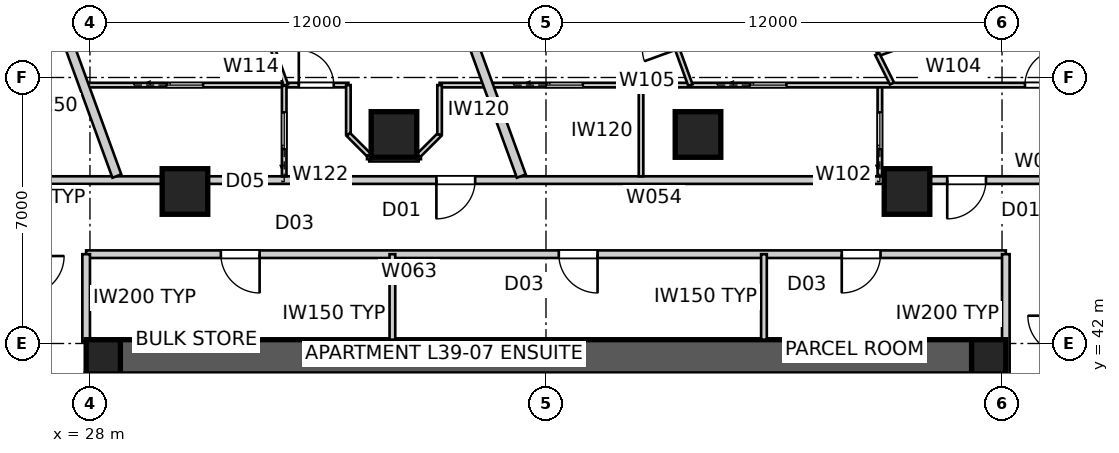
"""IFC4 building model, lengths in metres.
Left out: names, types, materials, properties, quantities, classifications, styles, units other than length and angle.
Written with IfcOpenShell. Run it as: python <this file> out.ifc"""

import sys

from ifc_helpers import new_model, si_unit, direction, frame, frame_2d, origin, origin_2d, place, context, subcontext, project, spatial, polyline, rectangle, outline, extrude, element, fill, save


model = new_model("IFC4")
c1 = context("Model", 3, precision=1e-05, world=origin(), true_north=direction((0.0, 1.0)))
c2 = subcontext(c1, "Body", "Model", "MODEL_VIEW")
j1 = project(units=[si_unit("LENGTHUNIT", "METRE"), si_unit("PLANEANGLEUNIT", "RADIAN")], contexts=[c1])
p1 = place(None, origin())
s1 = spatial("IfcSite", under=j1, at=p1, CompositionType="ELEMENT")
p2 = place(p1, origin())
s2 = spatial("IfcBuilding", under=s1, at=p2, CompositionType="ELEMENT")
p3 = place(p2, frame((0.0, 0.0, 143.8)))
s3 = spatial("IfcBuildingStorey", under=s2, at=p3, CompositionType="ELEMENT", Elevation=143.8)
p4 = place(p3, frame((28.8, 41.65, 0.0), z_axis=(0.0, 0.0, 1.0), x_axis=(1.0, 0.0, 0.0)))
e1 = element("IfcWall", 1, at=p4, inside=s3, PredefinedType="SHEAR", context=c2, shape_type="SweptSolid", body=[
    extrude(outline(polyline([(0.0, -0.45), (22.4, -0.45), (22.4, -0.025), (22.85, -0.025), (22.85, 0.025), (22.4, 0.025), (22.4, 0.45), (0.0, 0.45), (0.0, 0.025), (-0.45, 0.025), (-0.45, -0.025), (0.0, -0.025), (0.0, -0.45)])), origin(), (0.0, 0.0, 1.0), 3.4),
])
p5 = place(p3, frame((51.65, 18.8, 0.0), z_axis=(0.0, 0.0, 1.0), x_axis=(0.0, 1.0, 0.0)))
e2 = element("IfcWall", 2, at=p5, inside=s3, PredefinedType="SHEAR", context=c2, shape_type="SweptSolid", body=[
    extrude(outline(polyline([(0.0, -0.45), (22.4, -0.45), (22.4, -0.025), (22.85, -0.025), (22.85, 0.025), (22.4, 0.025), (22.4, 0.45), (0.0, 0.45), (0.0, 0.025), (-0.45, 0.025), (-0.45, -0.025), (0.0, -0.025), (0.0, -0.45)])), origin(), (0.0, 0.0, 1.0), 3.4),
])
p6 = place(p5, frame((11.14, 0.0, 0.0)))
e3 = element("IfcOpeningElement", 3, at=p6, cuts=e2, PredefinedType="OPENING", context=c2, shape_type="SweptSolid", body=[
    extrude(rectangle(XDim=1.02, YDim=2.4, at=frame_2d((0.51, 1.2))), frame((0.0, 0.46, 0.0), z_axis=(0.0, -1.0, 0.0), x_axis=(1.0, 0.0, 0.0)), (0.0, 0.0, 1.0), 0.92),
])
p7 = place(p3, frame((28.35, 41.2, 0.0), z_axis=(0.0, 0.0, 1.0), x_axis=(0.0, -1.0, 0.0)))
e4 = element("IfcWall", 4, at=p7, inside=s3, PredefinedType="SHEAR", context=c2, shape_type="SweptSolid", body=[
    extrude(outline(polyline([(0.0, -0.45), (22.4, -0.45), (22.4, -0.025), (22.85, -0.025), (22.85, 0.025), (22.4, 0.025), (22.4, 0.45), (0.0, 0.45), (0.0, 0.025), (-0.45, 0.025), (-0.45, -0.025), (0.0, -0.025), (0.0, -0.45)])), origin(), (0.0, 0.0, 1.0), 3.4),
])
p8 = place(p7, frame((11.14, 0.0, 0.0)))
e5 = element("IfcOpeningElement", 5, at=p8, cuts=e4, PredefinedType="OPENING", context=c2, shape_type="SweptSolid", body=[
    extrude(rectangle(XDim=1.02, YDim=2.4, at=frame_2d((0.51, 1.2))), frame((0.0, 0.46, 0.0), z_axis=(0.0, -1.0, 0.0), x_axis=(1.0, 0.0, 0.0)), (0.0, 0.0, 1.0), 0.92),
])
for number, where, z_axis, x_axis in (
    (6, (51.65, 41.65, 0.0), (0.0, 0.0, 1.0), (1.0, 0.0, 0.0)),
    (7, (28.35, 41.65, 0.0), (0.0, 0.0, 1.0), (1.0, 0.0, 0.0)),
):
    element("IfcColumn", number, at=place(p3, frame(where, z_axis=z_axis, x_axis=x_axis)), inside=s3, PredefinedType="COLUMN", context=c2, shape_type="SweptSolid", body=[
        extrude(rectangle(XDim=0.9, YDim=0.9, at=origin_2d()), origin(), (0.0, 0.0, 1.0), 3.4),
    ])
for number, where, z_axis, x_axis in (
    (8, (49.5, 46.0, 0.0), (0.0, 0.0, 1.0), (1.0, 0.0, 0.0)),
    (9, (44.0, 47.5, 0.0), (0.0, 0.0, 1.0), (1.0, 0.0, 0.0)),
    (10, (36.0, 47.5, 0.0), (0.0, 0.0, 1.0), (1.0, 0.0, 0.0)),
    (11, (30.5, 46.0, 0.0), (0.0, 0.0, 1.0), (1.0, 0.0, 0.0)),
):
    element("IfcColumn", number, at=place(p3, frame(where, z_axis=z_axis, x_axis=x_axis)), inside=s3, PredefinedType="COLUMN", context=c2, shape_type="SweptSolid", body=[
        extrude(rectangle(XDim=1.2, YDim=1.2, at=origin_2d()), origin(), (0.0, 0.0, 1.0), 3.4),
    ])
p9 = place(p3, frame((53.7, 46.3, 0.0), z_axis=(0.0, 0.0, 1.0), x_axis=(-1.0, 0.0, 0.0)))
e12 = element("IfcWall", 12, at=p9, inside=s3, PredefinedType="PARTITIONING", context=c2, shape_type="SweptSolid", body=[
    extrude(rectangle(XDim=4.458, YDim=0.2, at=frame_2d((2.229, 0.0))), origin(), (0.0, 0.0, 1.0), 3.25),
])
p10 = place(p9, frame((2.122, 0.0, 0.0)))
e13 = element("IfcOpeningElement", 13, at=p10, cuts=e12, PredefinedType="OPENING", context=c2, shape_type="SweptSolid", body=[
    extrude(rectangle(XDim=1.02, YDim=2.34, at=frame_2d((0.51, 1.17))), frame((0.0, 0.11, 0.0), z_axis=(0.0, -1.0, 0.0), x_axis=(1.0, 0.0, 0.0)), (0.0, 0.0, 1.0), 0.22),
])
p11 = place(p3, frame((49.242, 46.3, 0.0), z_axis=(0.0, 0.0, 1.0), x_axis=(-1.0, 0.0, 0.0)))
e14 = element("IfcWall", 14, at=p11, inside=s3, PredefinedType="PARTITIONING", context=c2, shape_type="SweptSolid", body=[
    extrude(rectangle(XDim=1.683, YDim=0.2, at=frame_2d((0.842, 0.0))), origin(), (0.0, 0.0, 1.0), 2.55),
])
p12 = place(p3, frame((47.558, 46.3, 0.0), z_axis=(0.0, 0.0, 1.0), x_axis=(-1.0, 0.0, 0.0)))
e15 = element("IfcWall", 15, at=p12, inside=s3, PredefinedType="PARTITIONING", context=c2, shape_type="SweptSolid", body=[
    extrude(rectangle(XDim=15.117, YDim=0.2, at=frame_2d((7.558, 0.0))), origin(), (0.0, 0.0, 1.0), 3.25),
])
p13 = place(p12, frame((9.422, 0.0, 0.0)))
e16 = element("IfcOpeningElement", 16, at=p13, cuts=e15, PredefinedType="OPENING", context=c2, shape_type="SweptSolid", body=[
    extrude(rectangle(XDim=1.02, YDim=2.34, at=frame_2d((0.51, 1.17))), frame((0.0, 0.11, 0.0), z_axis=(0.0, -1.0, 0.0), x_axis=(1.0, 0.0, 0.0)), (0.0, 0.0, 1.0), 0.22),
])
p14 = place(p3, frame((32.442, 46.3, 0.0), z_axis=(0.0, 0.0, 1.0), x_axis=(-1.0, 0.0, 0.0)))
e17 = element("IfcWall", 17, at=p14, inside=s3, PredefinedType="PARTITIONING", context=c2, shape_type="SweptSolid", body=[
    extrude(rectangle(XDim=1.683, YDim=0.2, at=frame_2d((0.842, 0.0))), origin(), (0.0, 0.0, 1.0), 2.55),
])
p15 = place(p3, frame((30.758, 46.3, 0.0), z_axis=(0.0, 0.0, 1.0), x_axis=(-1.0, 0.0, 0.0)))
e18 = element("IfcWall", 18, at=p15, inside=s3, PredefinedType="PARTITIONING", context=c2, shape_type="SweptSolid", body=[
    extrude(rectangle(XDim=4.458, YDim=0.2, at=frame_2d((2.229, 0.0))), origin(), (0.0, 0.0, 1.0), 3.25),
])
p16 = place(p3, frame((36.49, 54.263, 0.0), z_axis=(0.0, 0.0, 1.0), x_axis=(0.342019678743, -0.93969278988, 0.0)))
e19 = element("IfcWall", 19, at=p16, inside=s3, PredefinedType="PARTITIONING", context=c2, shape_type="SweptSolid", body=[
    extrude(rectangle(XDim=8.362, YDim=0.25, at=frame_2d((4.181, 0.0))), origin(), (0.0, 0.0, 1.0), 3.25),
])
p17 = place(p3, frame((27.093, 50.843, 0.0), z_axis=(0.0, 0.0, 1.0), x_axis=(0.342012883883, -0.939695262975, 0.0)))
e20 = element("IfcWall", 20, at=p17, inside=s3, PredefinedType="PARTITIONING", context=c2, shape_type="SweptSolid", body=[
    extrude(rectangle(XDim=4.722, YDim=0.25, at=frame_2d((2.361, 0.0))), origin(), (0.0, 0.0, 1.0), 3.25),
])
p18 = place(p3, frame((52.1, 44.35, 0.0), z_axis=(0.0, 0.0, 1.0), x_axis=(-1.0, 0.0, 0.0)))
e21 = element("IfcWall", 21, at=p18, inside=s3, PredefinedType="PARTITIONING", context=c2, shape_type="SweptSolid", body=[
    extrude(rectangle(XDim=24.2, YDim=0.2, at=frame_2d((12.1, 0.0))), origin(), (0.0, 0.0, 1.0), 3.25),
])
p19 = place(p18, frame((10.743, 0.0, 0.0)))
e22 = element("IfcOpeningElement", 22, at=p19, cuts=e21, PredefinedType="OPENING", context=c2, shape_type="SweptSolid", body=[
    extrude(rectangle(XDim=1.02, YDim=2.1, at=frame_2d((0.51, 1.05))), frame((0.0, 0.11, 0.0), z_axis=(0.0, -1.0, 0.0), x_axis=(1.0, 0.0, 0.0)), (0.0, 0.0, 1.0), 0.22),
])
p20 = place(p18, frame((19.636, 0.0, 0.0)))
e23 = element("IfcOpeningElement", 23, at=p20, cuts=e21, PredefinedType="OPENING", context=c2, shape_type="SweptSolid", body=[
    extrude(rectangle(XDim=1.02, YDim=2.1, at=frame_2d((0.51, 1.05))), frame((0.0, 0.11, 0.0), z_axis=(0.0, -1.0, 0.0), x_axis=(1.0, 0.0, 0.0)), (0.0, 0.0, 1.0), 0.22),
])
p21 = place(p18, frame((3.297, 0.0, 0.0)))
e24 = element("IfcOpeningElement", 24, at=p21, cuts=e21, PredefinedType="OPENING", context=c2, shape_type="SweptSolid", body=[
    extrude(rectangle(XDim=1.02, YDim=2.1, at=frame_2d((0.51, 1.05))), frame((0.0, 0.11, 0.0), z_axis=(0.0, -1.0, 0.0), x_axis=(1.0, 0.0, 0.0)), (0.0, 0.0, 1.0), 0.22),
])
p22 = place(p3, frame((27.9, 44.35, 0.0), z_axis=(0.0, 0.0, 1.0), x_axis=(0.0, -1.0, 0.0)))
e25 = element("IfcWall", 25, at=p22, inside=s3, PredefinedType="PARTITIONING", context=c2, shape_type="SweptSolid", body=[
    extrude(rectangle(XDim=2.3, YDim=0.2, at=frame_2d((1.15, 0.0))), origin(), (0.0, 0.0, 1.0), 3.25),
])
p23 = place(p3, frame((52.1, 41.18, 0.0), z_axis=(0.0, 0.0, 1.0), x_axis=(0.0, 1.0, 0.0)))
e26 = element("IfcWall", 26, at=p23, inside=s3, PredefinedType="PARTITIONING", context=c2, shape_type="SweptSolid", body=[
    extrude(rectangle(XDim=3.17, YDim=0.2, at=frame_2d((1.585, 0.0))), origin(), (0.0, 0.0, 1.0), 3.25),
])
p24 = place(p3, frame((35.958, 42.1, 0.0), z_axis=(0.0, 0.0, 1.0), x_axis=(0.0, 1.0, 0.0)))
e27 = element("IfcWall", 27, at=p24, inside=s3, PredefinedType="SOLIDWALL", context=c2, shape_type="SweptSolid", body=[
    extrude(rectangle(XDim=2.25, YDim=0.15, at=frame_2d((1.125, 0.0))), origin(), (0.0, 0.0, 1.0), 3.25),
])
p25 = place(p3, frame((45.735, 42.1, 0.0), z_axis=(0.0, 0.0, 1.0), x_axis=(0.0, 1.0, 0.0)))
e28 = element("IfcWall", 28, at=p25, inside=s3, PredefinedType="SOLIDWALL", context=c2, shape_type="SweptSolid", body=[
    extrude(rectangle(XDim=2.25, YDim=0.15, at=frame_2d((1.125, 0.0))), origin(), (0.0, 0.0, 1.0), 2.796),
])
p26 = place(p3, frame((48.786, 46.4, 0.0), z_axis=(0.0, 0.0, 1.0), x_axis=(0.0, 1.0, 0.0)))
e29 = element("IfcWall", 29, at=p26, inside=s3, PredefinedType="PARTITIONING", context=c2, shape_type="SweptSolid", body=[
    extrude(rectangle(XDim=2.4, YDim=0.12, at=frame_2d((1.2, 0.0))), origin(), (0.0, 0.0, 1.0), 3.25),
])
p27 = place(p26, frame((0.72, 0.0, 0.0)))
e30 = element("IfcOpeningElement", 30, at=p27, cuts=e29, PredefinedType="OPENING", context=c2, shape_type="SweptSolid", body=[
    extrude(rectangle(XDim=0.96, YDim=2.1, at=frame_2d((0.48, 1.05))), frame((0.0, 0.07, 0.0), z_axis=(0.0, -1.0, 0.0), x_axis=(1.0, 0.0, 0.0)), (0.0, 0.0, 1.0), 0.14),
])
p28 = place(p3, frame((42.501, 46.4, 0.0), z_axis=(0.0, 0.0, 1.0), x_axis=(0.0, 1.0, 0.0)))
e31 = element("IfcWall", 31, at=p28, inside=s3, PredefinedType="PARTITIONING", context=c2, shape_type="SweptSolid", body=[
    extrude(rectangle(XDim=2.4, YDim=0.12, at=frame_2d((1.2, 0.0))), origin(), (0.0, 0.0, 1.0), 3.25),
])
p29 = place(p3, frame((37.2, 48.8, 0.0), z_axis=(0.0, 0.0, 1.0), x_axis=(1.0, 0.0, 0.0)))
e32 = element("IfcWall", 32, at=p29, inside=s3, PredefinedType="PARTITIONING", context=c2, shape_type="SweptSolid", body=[
    extrude(rectangle(XDim=19.8, YDim=0.12, at=frame_2d((9.9, 0.0))), origin(), (0.0, 0.0, 1.0), 3.25),
])
p30 = place(p29, frame((15.403, 0.0, 0.0)))
e33 = element("IfcOpeningElement", 33, at=p30, cuts=e32, PredefinedType="OPENING", context=c2, shape_type="SweptSolid", body=[
    extrude(rectangle(XDim=0.92, YDim=2.34, at=frame_2d((0.46, 1.17))), frame((0.0, 0.07, 0.0), z_axis=(0.0, -1.0, 0.0), x_axis=(1.0, 0.0, 0.0)), (0.0, 0.0, 1.0), 0.14),
])
p31 = place(p29, frame((8.165, 0.0, 0.0)))
e34 = element("IfcOpeningElement", 34, at=p31, cuts=e32, PredefinedType="OPENING", context=c2, shape_type="SweptSolid", body=[
    extrude(rectangle(XDim=0.96, YDim=2.1, at=frame_2d((0.48, 1.05))), frame((0.0, 0.07, 0.0), z_axis=(0.0, -1.0, 0.0), x_axis=(1.0, 0.0, 0.0)), (0.0, 0.0, 1.0), 0.14),
])
p32 = place(p29, frame((2.81, 0.0, 0.0)))
e35 = element("IfcOpeningElement", 35, at=p32, cuts=e32, PredefinedType="OPENING", context=c2, shape_type="SweptSolid", body=[
    extrude(rectangle(XDim=0.96, YDim=2.1, at=frame_2d((0.48, 1.05))), frame((0.0, 0.07, 0.0), z_axis=(0.0, -1.0, 0.0), x_axis=(1.0, 0.0, 0.0)), (0.0, 0.0, 1.0), 0.14),
])
p33 = place(p3, frame((43.799, 48.8, 0.0), z_axis=(0.0, 0.0, 1.0), x_axis=(-0.342034943783, 0.939687233728, 0.0)))
e36 = element("IfcWall", 36, at=p33, inside=s3, PredefinedType="PARTITIONING", context=c2, shape_type="SweptSolid", body=[
    extrude(rectangle(XDim=3.223, YDim=0.12, at=frame_2d((1.612, 0.0))), origin(), (0.0, 0.0, 1.0), 3.25),
])
p34 = place(p33, frame((1.004, 0.0, 0.0)))
e37 = element("IfcOpeningElement", 37, at=p34, cuts=e36, PredefinedType="OPENING", context=c2, shape_type="SweptSolid", body=[
    extrude(rectangle(XDim=0.92, YDim=2.34, at=frame_2d((0.46, 1.17))), frame((0.0, 0.07, 0.0), z_axis=(0.0, -1.0, 0.0), x_axis=(1.0, 0.0, 0.0)), (0.0, 0.0, 1.0), 0.14),
])
p35 = place(p3, frame((57.231, 52.713, 0.0), z_axis=(0.0, 0.0, 1.0), x_axis=(-0.939692673089, -0.342019999623, 0.0)))
e38 = element("IfcWall", 38, at=p35, inside=s3, PredefinedType="PARTITIONING", context=c2, shape_type="SweptSolid", body=[
    extrude(rectangle(XDim=9.06, YDim=0.12, at=frame_2d((4.53, 0.0))), origin(), (0.0, 0.0, 1.0), 3.25),
])
p36 = place(p3, frame((48.717, 49.615, 0.0), z_axis=(0.0, 0.0, 1.0), x_axis=(0.448117513314, -0.893974660861, 0.0)))
e39 = element("IfcWall", 39, at=p36, inside=s3, PredefinedType="PARTITIONING", context=c2, shape_type="SweptSolid", body=[
    extrude(rectangle(XDim=0.864, YDim=0.12, at=frame_2d((0.432, 0.0))), origin(), (0.0, 0.0, 1.0), 3.25),
])
p37 = place(p3, frame((27.836, 48.8, 0.0), z_axis=(0.0, 0.0, 1.0), x_axis=(1.0, 0.0, 0.0)))
e40 = element("IfcWall", 40, at=p37, inside=s3, PredefinedType="PARTITIONING", context=c2, shape_type="SweptSolid", body=[
    extrude(rectangle(XDim=6.964, YDim=0.12, at=frame_2d((3.482, 0.0))), origin(), (0.0, 0.0, 1.0), 3.25),
])
p38 = place(p37, frame((5.659, 0.0, 0.0)))
e41 = element("IfcOpeningElement", 41, at=p38, cuts=e40, PredefinedType="OPENING", context=c2, shape_type="SweptSolid", body=[
    extrude(rectangle(XDim=0.92, YDim=2.34, at=frame_2d((0.46, 1.17))), frame((0.0, 0.07, 0.0), z_axis=(0.0, -1.0, 0.0), x_axis=(1.0, 0.0, 0.0)), (0.0, 0.0, 1.0), 0.14),
])
p39 = place(p37, frame((2.18, 0.0, 0.0)))
e42 = element("IfcOpeningElement", 42, at=p39, cuts=e40, PredefinedType="OPENING", context=c2, shape_type="SweptSolid", body=[
    extrude(rectangle(XDim=0.96, YDim=2.1, at=frame_2d((0.48, 1.05))), frame((0.0, 0.07, 0.0), z_axis=(0.0, -1.0, 0.0), x_axis=(1.0, 0.0, 0.0)), (0.0, 0.0, 1.0), 0.14),
])
p40 = place(p3, frame((34.8, 48.8, 0.0), z_axis=(0.0, 0.0, 1.0), x_axis=(0.0, -1.0, 0.0)))
e43 = element("IfcWall", 43, at=p40, inside=s3, PredefinedType="PARTITIONING", context=c2, shape_type="SweptSolid", body=[
    extrude(rectangle(XDim=1.3, YDim=0.12, at=frame_2d((0.65, 0.0))), origin(), (0.0, 0.0, 1.0), 3.25),
])
p41 = place(p3, frame((34.8, 47.5, 0.0), z_axis=(0.0, 0.0, 1.0), x_axis=(0.707106781187, -0.707106781187, 0.0)))
e44 = element("IfcWall", 44, at=p41, inside=s3, PredefinedType="PARTITIONING", context=c2, shape_type="SweptSolid", body=[
    extrude(rectangle(XDim=0.778, YDim=0.12, at=frame_2d((0.389, 0.0))), origin(), (0.0, 0.0, 1.0), 3.25),
])
p42 = place(p3, frame((35.35, 46.85, 0.0), z_axis=(0.0, 0.0, 1.0), x_axis=(1.0, 0.0, 0.0)))
e45 = element("IfcWall", 45, at=p42, inside=s3, PredefinedType="PARTITIONING", context=c2, shape_type="SweptSolid", body=[
    extrude(rectangle(XDim=1.3, YDim=0.12, at=frame_2d((0.65, 0.0))), origin(), (0.0, 0.0, 1.0), 3.25),
])
p43 = place(p3, frame((36.65, 46.95, 0.0), z_axis=(0.0, 0.0, 1.0), x_axis=(0.707106781187, 0.707106781187, 0.0)))
e46 = element("IfcWall", 46, at=p43, inside=s3, PredefinedType="PARTITIONING", context=c2, shape_type="SweptSolid", body=[
    extrude(rectangle(XDim=0.778, YDim=0.12, at=frame_2d((0.389, 0.0))), origin(), (0.0, 0.0, 1.0), 3.25),
])
p44 = place(p3, frame((37.2, 47.5, 0.0), z_axis=(0.0, 0.0, 1.0), x_axis=(0.0, 1.0, 0.0)))
e47 = element("IfcWall", 47, at=p44, inside=s3, PredefinedType="PARTITIONING", context=c2, shape_type="SweptSolid", body=[
    extrude(rectangle(XDim=1.3, YDim=0.12, at=frame_2d((0.65, 0.0))), origin(), (0.0, 0.0, 1.0), 3.25),
])
p45 = place(p3, frame((33.112, 46.4, 0.0), z_axis=(0.0, 0.0, 1.0), x_axis=(0.0, 1.0, 0.0)))
e48 = element("IfcWall", 48, at=p45, inside=s3, PredefinedType="PARTITIONING", context=c2, shape_type="SweptSolid", body=[
    extrude(rectangle(XDim=2.4, YDim=0.12, at=frame_2d((1.2, 0.0))), origin(), (0.0, 0.0, 1.0), 3.25),
])
p46 = place(p45, frame((0.72, 0.0, 0.0)))
e49 = element("IfcOpeningElement", 49, at=p46, cuts=e48, PredefinedType="OPENING", context=c2, shape_type="SweptSolid", body=[
    extrude(rectangle(XDim=0.96, YDim=2.1, at=frame_2d((0.48, 1.05))), frame((0.0, 0.07, 0.0), z_axis=(0.0, -1.0, 0.0), x_axis=(1.0, 0.0, 0.0)), (0.0, 0.0, 1.0), 0.14),
])
p47 = place(p3, frame((33.157, 48.8, 0.0), z_axis=(0.0, 0.0, 1.0), x_axis=(-0.341990966768, 0.939703239672, 0.0)))
e50 = element("IfcWall", 50, at=p47, inside=s3, PredefinedType="PARTITIONING", context=c2, shape_type="SweptSolid", body=[
    extrude(rectangle(XDim=3.953, YDim=0.12, at=frame_2d((1.977, 0.0))), origin(), (0.0, 0.0, 1.0), 3.25),
])
for number, where, z_axis, x_axis in (
    (51, (35.35, 46.85, 0.0), (0.0, 0.0, 1.0), (0.0, 1.0, 0.0)),
    (52, (36.65, 46.85, 0.0), (0.0, 0.0, 1.0), (0.0, 1.0, 0.0)),
):
    element("IfcWall", number, at=place(p3, frame(where, z_axis=z_axis, x_axis=x_axis)), inside=s3, PredefinedType="PARTITIONING", context=c2, shape_type="SweptSolid", body=[
        extrude(rectangle(XDim=0.1, YDim=0.12, at=frame_2d((0.05, 0.0))), origin(), (0.0, 0.0, 1.0), 3.25),
    ])
p48 = place(p19, origin())
e53 = element("IfcDoor", 53, at=p48, inside=s3, OperationType="SINGLE_SWING_LEFT", PredefinedType="DOOR", context=c2, shape_type="SweptSolid", body=[
    extrude(rectangle(XDim=1.02, YDim=2.1, at=frame_2d((0.51, 1.05))), frame((0.0, 0.025, 0.0), z_axis=(0.0, -1.0, 0.0), x_axis=(1.0, 0.0, 0.0)), (0.0, 0.0, 1.0), 0.05),
])
fill(e22, e53)
p49 = place(p20, origin())
e54 = element("IfcDoor", 54, at=p49, inside=s3, OperationType="SINGLE_SWING_LEFT", PredefinedType="DOOR", context=c2, shape_type="SweptSolid", body=[
    extrude(rectangle(XDim=1.02, YDim=2.1, at=frame_2d((0.51, 1.05))), frame((0.0, 0.025, 0.0), z_axis=(0.0, -1.0, 0.0), x_axis=(1.0, 0.0, 0.0)), (0.0, 0.0, 1.0), 0.05),
])
fill(e23, e54)
p50 = place(p13, origin())
e55 = element("IfcDoor", 55, at=p50, inside=s3, OperationType="SINGLE_SWING_RIGHT", PredefinedType="DOOR", context=c2, shape_type="SweptSolid", body=[
    extrude(rectangle(XDim=1.02, YDim=2.34, at=frame_2d((0.51, 1.17))), frame((0.0, 0.025, 0.0), z_axis=(0.0, -1.0, 0.0), x_axis=(1.0, 0.0, 0.0)), (0.0, 0.0, 1.0), 0.05),
])
fill(e16, e55)
p51 = place(p21, origin())
e56 = element("IfcDoor", 56, at=p51, inside=s3, OperationType="SINGLE_SWING_RIGHT", PredefinedType="DOOR", context=c2, shape_type="SweptSolid", body=[
    extrude(rectangle(XDim=1.02, YDim=2.1, at=frame_2d((0.51, 1.05))), frame((0.0, 0.025, 0.0), z_axis=(0.0, -1.0, 0.0), x_axis=(1.0, 0.0, 0.0)), (0.0, 0.0, 1.0), 0.05),
])
fill(e24, e56)
p52 = place(p10, origin())
e57 = element("IfcDoor", 57, at=p52, inside=s3, OperationType="SINGLE_SWING_RIGHT", PredefinedType="DOOR", context=c2, shape_type="SweptSolid", body=[
    extrude(rectangle(XDim=1.02, YDim=2.34, at=frame_2d((0.51, 1.17))), frame((0.0, 0.025, 0.0), z_axis=(0.0, -1.0, 0.0), x_axis=(1.0, 0.0, 0.0)), (0.0, 0.0, 1.0), 0.05),
])
fill(e13, e57)
p53 = place(p46, origin())
e58 = element("IfcDoor", 58, at=p53, inside=s3, OperationType="SLIDING_TO_LEFT", PredefinedType="DOOR", context=c2, shape_type="SweptSolid", body=[
    extrude(rectangle(XDim=0.96, YDim=2.1, at=frame_2d((0.48, 1.05))), frame((0.0, 0.025, 0.0), z_axis=(0.0, -1.0, 0.0), x_axis=(1.0, 0.0, 0.0)), (0.0, 0.0, 1.0), 0.05),
])
fill(e49, e58)
p54 = place(p38, origin())
e59 = element("IfcDoor", 59, at=p54, inside=s3, OperationType="SINGLE_SWING_LEFT", PredefinedType="DOOR", context=c2, shape_type="SweptSolid", body=[
    extrude(rectangle(XDim=0.92, YDim=2.34, at=frame_2d((0.46, 1.17))), frame((0.0, 0.025, 0.0), z_axis=(0.0, -1.0, 0.0), x_axis=(1.0, 0.0, 0.0)), (0.0, 0.0, 1.0), 0.05),
])
fill(e41, e59)
p55 = place(p30, origin())
e60 = element("IfcDoor", 60, at=p55, inside=s3, OperationType="SINGLE_SWING_RIGHT", PredefinedType="DOOR", context=c2, shape_type="SweptSolid", body=[
    extrude(rectangle(XDim=0.92, YDim=2.34, at=frame_2d((0.46, 1.17))), frame((0.0, 0.025, 0.0), z_axis=(0.0, -1.0, 0.0), x_axis=(1.0, 0.0, 0.0)), (0.0, 0.0, 1.0), 0.05),
])
fill(e33, e60)
p56 = place(p27, origin())
e61 = element("IfcDoor", 61, at=p56, inside=s3, OperationType="SLIDING_TO_LEFT", PredefinedType="DOOR", context=c2, shape_type="SweptSolid", body=[
    extrude(rectangle(XDim=0.96, YDim=2.1, at=frame_2d((0.48, 1.05))), frame((0.0, 0.025, 0.0), z_axis=(0.0, -1.0, 0.0), x_axis=(1.0, 0.0, 0.0)), (0.0, 0.0, 1.0), 0.05),
])
fill(e30, e61)
p57 = place(p39, origin())
e62 = element("IfcDoor", 62, at=p57, inside=s3, OperationType="SLIDING_TO_LEFT", PredefinedType="DOOR", context=c2, shape_type="SweptSolid", body=[
    extrude(rectangle(XDim=0.96, YDim=2.1, at=frame_2d((0.48, 1.05))), frame((0.0, 0.025, 0.0), z_axis=(0.0, -1.0, 0.0), x_axis=(1.0, 0.0, 0.0)), (0.0, 0.0, 1.0), 0.05),
])
fill(e42, e62)
p58 = place(p31, origin())
e63 = element("IfcDoor", 63, at=p58, inside=s3, OperationType="SLIDING_TO_LEFT", PredefinedType="DOOR", context=c2, shape_type="SweptSolid", body=[
    extrude(rectangle(XDim=0.96, YDim=2.1, at=frame_2d((0.48, 1.05))), frame((0.0, 0.025, 0.0), z_axis=(0.0, -1.0, 0.0), x_axis=(1.0, 0.0, 0.0)), (0.0, 0.0, 1.0), 0.05),
])
fill(e34, e63)
p59 = place(p32, origin())
e64 = element("IfcDoor", 64, at=p59, inside=s3, OperationType="SLIDING_TO_LEFT", PredefinedType="DOOR", context=c2, shape_type="SweptSolid", body=[
    extrude(rectangle(XDim=0.96, YDim=2.1, at=frame_2d((0.48, 1.05))), frame((0.0, 0.025, 0.0), z_axis=(0.0, -1.0, 0.0), x_axis=(1.0, 0.0, 0.0)), (0.0, 0.0, 1.0), 0.05),
])
fill(e35, e64)
save(model, sys.argv[1])
